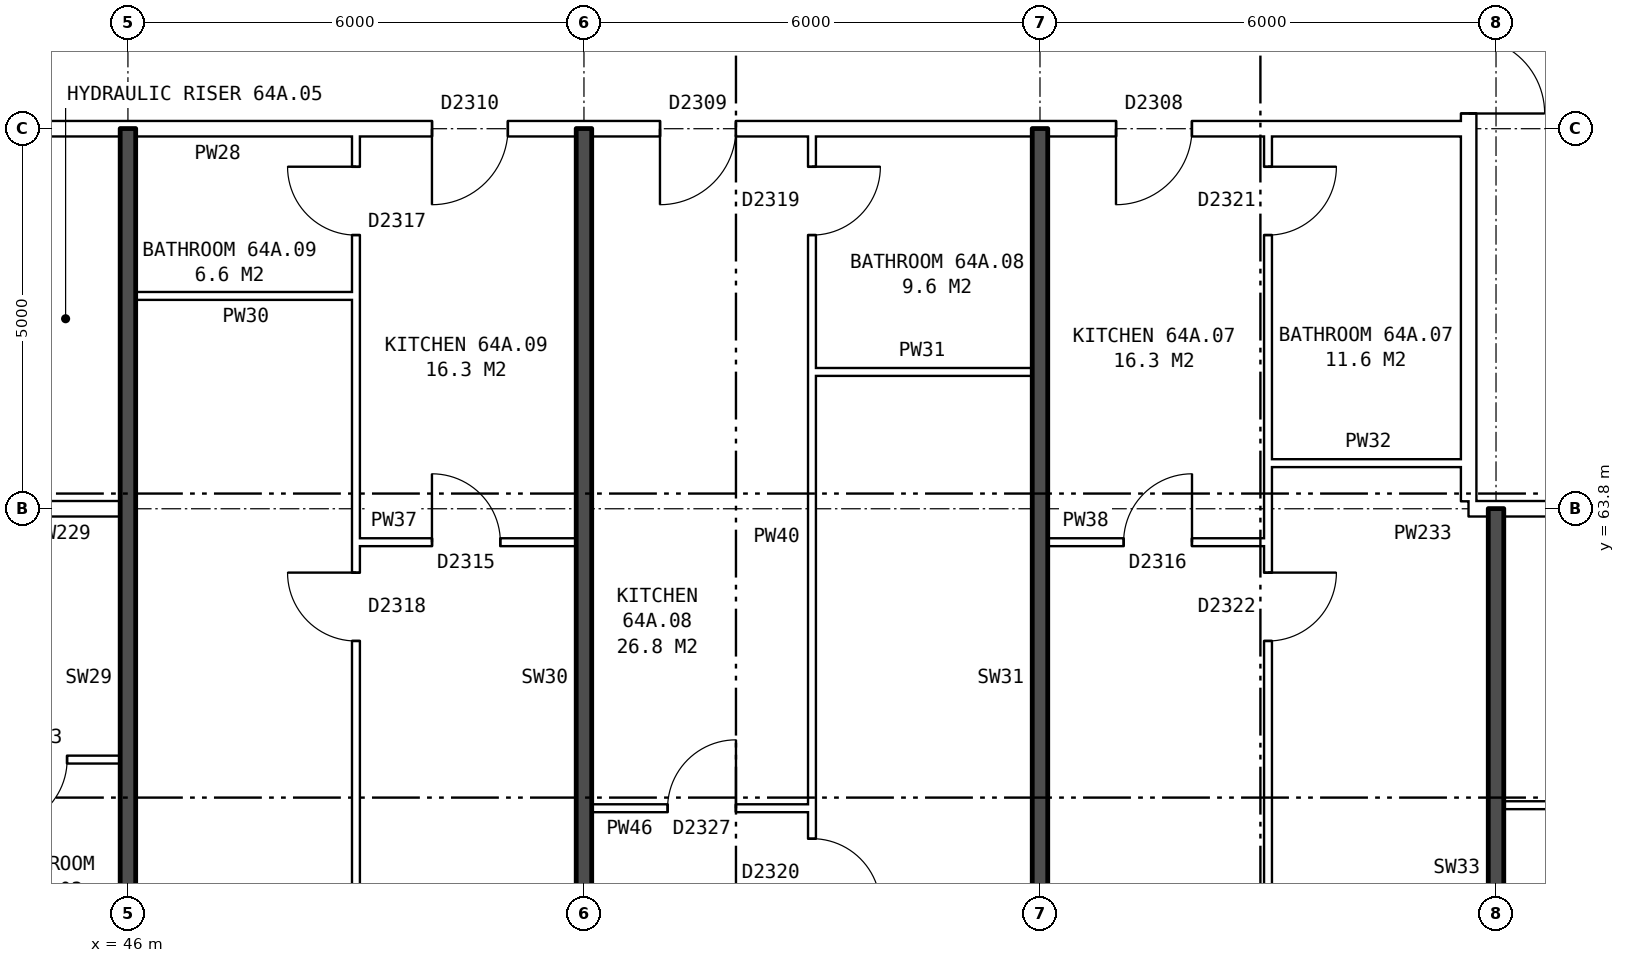
"""IFC4 building model, lengths in metres.
Left out: names, types, materials, properties, quantities, classifications, styles, units other than length and angle.
Written with IfcOpenShell. Run it as: python <this file> out.ifc"""

import sys

from ifc_helpers import new_model, si_unit, direction, frame, frame_2d, origin, place, context, subcontext, project, spatial, rectangle, extrude, element, fill, save


model = new_model("IFC4")
c1 = context("Model", 3, precision=1e-05, world=origin(), true_north=direction((0.0, 1.0)))
c2 = subcontext(c1, "Body", "Model", "MODEL_VIEW")
j1 = project(units=[si_unit("LENGTHUNIT", "METRE"), si_unit("PLANEANGLEUNIT", "RADIAN")], contexts=[c1])
p1 = place(None, origin())
s1 = spatial("IfcSite", under=j1, at=p1, CompositionType="ELEMENT")
p2 = place(p1, origin())
s2 = spatial("IfcBuilding", under=s1, at=p2, CompositionType="ELEMENT")
p3 = place(p2, frame((0.0, 0.0, 227.6)))
s3 = spatial("IfcBuildingStorey", under=s2, at=p3, CompositionType="ELEMENT", Elevation=227.6)
p4 = place(p3, frame((63.64, 63.9, 0.0), z_axis=(0.0, 0.0, 1.0), x_axis=(0.0, 1.0, 0.0)))
e1 = element("IfcWall", 1, at=p4, inside=s3, PredefinedType="PARTITIONING", context=c2, shape_type="SweptSolid", body=[
    extrude(rectangle(XDim=12.2, YDim=0.2, at=frame_2d((6.1, 0.0))), origin(), (0.0, 0.0, 1.0), 2.85),
])
p5 = place(p4, frame((5.1, 0.0, 0.0)))
e2 = element("IfcOpeningElement", 2, at=p5, cuts=e1, PredefinedType="OPENING", context=c2, shape_type="SweptSolid", body=[
    extrude(rectangle(XDim=2.0, YDim=2.1, at=frame_2d((1.0, 1.05))), frame((0.0, 0.11, 0.0), z_axis=(0.0, -1.0, 0.0), x_axis=(1.0, 0.0, 0.0)), (0.0, 0.0, 1.0), 0.22),
])
p6 = place(p3, frame((52.1, 59.86, 0.0), z_axis=(0.0, 0.0, 1.0), x_axis=(1.0, 0.0, 0.0)))
e3 = element("IfcWall", 3, at=p6, inside=s3, PredefinedType="PARTITIONING", context=c2, shape_type="SweptSolid", body=[
    extrude(rectangle(XDim=2.9, YDim=0.1, at=frame_2d((1.45, 0.0))), origin(), (0.0, 0.0, 1.0), 2.85),
])
p7 = place(p6, frame((1.0, 0.0, 0.0)))
e4 = element("IfcOpeningElement", 4, at=p7, cuts=e3, PredefinedType="OPENING", context=c2, shape_type="SweptSolid", body=[
    extrude(rectangle(XDim=0.9, YDim=2.1, at=frame_2d((0.45, 1.05))), frame((0.0, 0.06, 0.0), z_axis=(0.0, -1.0, 0.0), x_axis=(1.0, 0.0, 0.0)), (0.0, 0.0, 1.0), 0.12),
])
p8 = place(p3, frame((64.1, 59.9, 0.0), z_axis=(0.0, 0.0, 1.0), x_axis=(1.0, 0.0, 0.0)))
e5 = element("IfcWall", 5, at=p8, inside=s3, PredefinedType="PARTITIONING", context=c2, shape_type="SweptSolid", body=[
    extrude(rectangle(XDim=5.8, YDim=0.1, at=frame_2d((2.9, 0.0))), origin(), (0.0, 0.0, 1.0), 2.85),
])
p9 = place(p8, frame((3.6, 0.0, 0.0)))
e6 = element("IfcOpeningElement", 6, at=p9, cuts=e5, PredefinedType="OPENING", context=c2, shape_type="SweptSolid", body=[
    extrude(rectangle(XDim=0.9, YDim=2.1, at=frame_2d((0.45, 1.05))), frame((0.0, 0.06, 0.0), z_axis=(0.0, -1.0, 0.0), x_axis=(1.0, 0.0, 0.0)), (0.0, 0.0, 1.0), 0.12),
])
p10 = place(p8, frame((0.7, 0.0, 0.0)))
e7 = element("IfcOpeningElement", 7, at=p10, cuts=e5, PredefinedType="OPENING", context=c2, shape_type="SweptSolid", body=[
    extrude(rectangle(XDim=0.9, YDim=2.1, at=frame_2d((0.45, 1.05))), frame((0.0, 0.06, 0.0), z_axis=(0.0, -1.0, 0.0), x_axis=(1.0, 0.0, 0.0)), (0.0, 0.0, 1.0), 0.12),
])
p11 = place(p3, frame((40.1, 60.5, 0.0), z_axis=(0.0, 0.0, 1.0), x_axis=(1.0, 0.0, 0.0)))
e8 = element("IfcWall", 8, at=p11, inside=s3, PredefinedType="PARTITIONING", context=c2, shape_type="SweptSolid", body=[
    extrude(rectangle(XDim=5.8, YDim=0.1, at=frame_2d((2.9, 0.0))), origin(), (0.0, 0.0, 1.0), 2.85),
])
p12 = place(p11, frame((1.3, 0.0, 0.0)))
e9 = element("IfcOpeningElement", 9, at=p12, cuts=e8, PredefinedType="OPENING", context=c2, shape_type="SweptSolid", body=[
    extrude(rectangle(XDim=0.9, YDim=2.1, at=frame_2d((0.45, 1.05))), frame((0.0, 0.06, 0.0), z_axis=(0.0, -1.0, 0.0), x_axis=(1.0, 0.0, 0.0)), (0.0, 0.0, 1.0), 0.12),
])
p13 = place(p11, frame((4.2, 0.0, 0.0)))
e10 = element("IfcOpeningElement", 10, at=p13, cuts=e8, PredefinedType="OPENING", context=c2, shape_type="SweptSolid", body=[
    extrude(rectangle(XDim=0.9, YDim=2.1, at=frame_2d((0.45, 1.05))), frame((0.0, 0.06, 0.0), z_axis=(0.0, -1.0, 0.0), x_axis=(1.0, 0.0, 0.0)), (0.0, 0.0, 1.0), 0.12),
])
p14 = place(p3, frame((49.0, 63.36, 0.0), z_axis=(0.0, 0.0, 1.0), x_axis=(1.0, 0.0, 0.0)))
e11 = element("IfcWall", 11, at=p14, inside=s3, PredefinedType="PARTITIONING", context=c2, shape_type="SweptSolid", body=[
    extrude(rectangle(XDim=2.9, YDim=0.1, at=frame_2d((1.45, 0.0))), origin(), (0.0, 0.0, 1.0), 2.85),
])
p15 = place(p14, frame((1.0, 0.0, 0.0)))
e12 = element("IfcOpeningElement", 12, at=p15, cuts=e11, PredefinedType="OPENING", context=c2, shape_type="SweptSolid", body=[
    extrude(rectangle(XDim=0.9, YDim=2.1, at=frame_2d((0.45, 1.05))), frame((0.0, 0.06, 0.0), z_axis=(0.0, -1.0, 0.0), x_axis=(1.0, 0.0, 0.0)), (0.0, 0.0, 1.0), 0.12),
])
p16 = place(p3, frame((58.1, 63.36, 0.0), z_axis=(0.0, 0.0, 1.0), x_axis=(1.0, 0.0, 0.0)))
e13 = element("IfcWall", 13, at=p16, inside=s3, PredefinedType="PARTITIONING", context=c2, shape_type="SweptSolid", body=[
    extrude(rectangle(XDim=2.9, YDim=0.1, at=frame_2d((1.45, 0.0))), origin(), (0.0, 0.0, 1.0), 2.85),
])
p17 = place(p16, frame((1.0, 0.0, 0.0)))
e14 = element("IfcOpeningElement", 14, at=p17, cuts=e13, PredefinedType="OPENING", context=c2, shape_type="SweptSolid", body=[
    extrude(rectangle(XDim=0.9, YDim=2.1, at=frame_2d((0.45, 1.05))), frame((0.0, 0.06, 0.0), z_axis=(0.0, -1.0, 0.0), x_axis=(1.0, 0.0, 0.0)), (0.0, 0.0, 1.0), 0.12),
])
p18 = place(p3, frame((44.36, 63.8, 0.0), z_axis=(0.0, 0.0, 1.0), x_axis=(1.0, 0.0, 0.0)))
e15 = element("IfcWall", 15, at=p18, inside=s3, PredefinedType="PARTITIONING", context=c2, shape_type="SweptSolid", body=[
    extrude(rectangle(XDim=1.54, YDim=0.2, at=frame_2d((0.77, 0.0))), origin(), (0.0, 0.0, 1.0), 2.85),
])
p19 = place(p3, frame((63.64, 63.8, 0.0), z_axis=(0.0, 0.0, 1.0), x_axis=(1.0, 0.0, 0.0)))
e16 = element("IfcWall", 16, at=p19, inside=s3, PredefinedType="PARTITIONING", context=c2, shape_type="SweptSolid", body=[
    extrude(rectangle(XDim=3.0, YDim=0.2, at=frame_2d((1.5, 0.0))), origin(), (0.0, 0.0, 1.0), 2.85),
])
p20 = place(p19, frame((1.18, 0.0, 0.0)))
e17 = element("IfcOpeningElement", 17, at=p20, cuts=e16, PredefinedType="OPENING", context=c2, shape_type="SweptSolid", body=[
    extrude(rectangle(XDim=1.0, YDim=2.1, at=frame_2d((0.5, 1.05))), frame((0.0, 0.11, 0.0), z_axis=(0.0, -1.0, 0.0), x_axis=(1.0, 0.0, 0.0)), (0.0, 0.0, 1.0), 0.22),
])
p21 = place(p3, frame((61.0, 64.4, 0.0), z_axis=(0.0, 0.0, 1.0), x_axis=(1.0, 0.0, 0.0)))
e18 = element("IfcWall", 18, at=p21, inside=s3, PredefinedType="PARTITIONING", context=c2, shape_type="SweptSolid", body=[
    extrude(rectangle(XDim=2.64, YDim=0.1, at=frame_2d((1.32, 0.0))), origin(), (0.0, 0.0, 1.0), 2.85),
])
for number, where, z_axis, x_axis in (
    (19, (55.0, 65.6, 0.0), (0.0, 0.0, 1.0), (1.0, 0.0, 0.0)),
    (20, (46.1, 66.6, 0.0), (0.0, 0.0, 1.0), (1.0, 0.0, 0.0)),
):
    element("IfcWall", number, at=place(p3, frame(where, z_axis=z_axis, x_axis=x_axis)), inside=s3, PredefinedType="PARTITIONING", context=c2, shape_type="SweptSolid", body=[
        extrude(rectangle(XDim=2.9, YDim=0.1, at=frame_2d((1.45, 0.0))), origin(), (0.0, 0.0, 1.0), 2.85),
    ])
p22 = place(p3, frame((44.36, 68.8, 0.0), z_axis=(0.0, 0.0, 1.0), x_axis=(1.0, 0.0, 0.0)))
e21 = element("IfcWall", 21, at=p22, inside=s3, PredefinedType="PARTITIONING", context=c2, shape_type="SweptSolid", body=[
    extrude(rectangle(XDim=19.28, YDim=0.2, at=frame_2d((9.64, 0.0))), origin(), (0.0, 0.0, 1.0), 2.85),
])
p23 = place(p22, frame((14.64, 0.0, 0.0)))
e22 = element("IfcOpeningElement", 22, at=p23, cuts=e21, PredefinedType="OPENING", context=c2, shape_type="SweptSolid", body=[
    extrude(rectangle(XDim=1.0, YDim=2.1, at=frame_2d((0.5, 1.05))), frame((0.0, 0.11, 0.0), z_axis=(0.0, -1.0, 0.0), x_axis=(1.0, 0.0, 0.0)), (0.0, 0.0, 1.0), 0.22),
])
p24 = place(p22, frame((8.64, 0.0, 0.0)))
e23 = element("IfcOpeningElement", 23, at=p24, cuts=e21, PredefinedType="OPENING", context=c2, shape_type="SweptSolid", body=[
    extrude(rectangle(XDim=1.0, YDim=2.1, at=frame_2d((0.5, 1.05))), frame((0.0, 0.11, 0.0), z_axis=(0.0, -1.0, 0.0), x_axis=(1.0, 0.0, 0.0)), (0.0, 0.0, 1.0), 0.22),
])
p25 = place(p22, frame((5.64, 0.0, 0.0)))
e24 = element("IfcOpeningElement", 24, at=p25, cuts=e21, PredefinedType="OPENING", context=c2, shape_type="SweptSolid", body=[
    extrude(rectangle(XDim=1.0, YDim=2.1, at=frame_2d((0.5, 1.05))), frame((0.0, 0.11, 0.0), z_axis=(0.0, -1.0, 0.0), x_axis=(1.0, 0.0, 0.0)), (0.0, 0.0, 1.0), 0.22),
])
p26 = place(p3, frame((46.0, 54.36, 0.0), z_axis=(0.0, 0.0, 1.0), x_axis=(0.0, 1.0, 0.0)))
e25 = element("IfcWall", 25, at=p26, inside=s3, PredefinedType="SOLIDWALL", context=c2, shape_type="SweptSolid", body=[
    extrude(rectangle(XDim=14.44, YDim=0.2, at=frame_2d((7.22, 0.0))), origin(), (0.0, 0.0, 1.0), 2.85),
])
p27 = place(p3, frame((49.0, 54.36, 0.0), z_axis=(0.0, 0.0, 1.0), x_axis=(0.0, 1.0, 0.0)))
e26 = element("IfcWall", 26, at=p27, inside=s3, PredefinedType="PARTITIONING", context=c2, shape_type="SweptSolid", body=[
    extrude(rectangle(XDim=14.34, YDim=0.1, at=frame_2d((7.17, 0.0))), origin(), (0.0, 0.0, 1.0), 2.85),
])
p28 = place(p27, frame((7.7, 0.0, 0.0)))
e27 = element("IfcOpeningElement", 27, at=p28, cuts=e26, PredefinedType="OPENING", context=c2, shape_type="SweptSolid", body=[
    extrude(rectangle(XDim=0.9, YDim=2.1, at=frame_2d((0.45, 1.05))), frame((0.0, 0.06, 0.0), z_axis=(0.0, -1.0, 0.0), x_axis=(1.0, 0.0, 0.0)), (0.0, 0.0, 1.0), 0.12),
])
p29 = place(p27, frame((13.04, 0.0, 0.0)))
e28 = element("IfcOpeningElement", 28, at=p29, cuts=e26, PredefinedType="OPENING", context=c2, shape_type="SweptSolid", body=[
    extrude(rectangle(XDim=0.9, YDim=2.1, at=frame_2d((0.45, 1.05))), frame((0.0, 0.06, 0.0), z_axis=(0.0, -1.0, 0.0), x_axis=(1.0, 0.0, 0.0)), (0.0, 0.0, 1.0), 0.12),
])
p30 = place(p3, frame((52.0, 54.36, 0.0), z_axis=(0.0, 0.0, 1.0), x_axis=(0.0, 1.0, 0.0)))
e29 = element("IfcWall", 29, at=p30, inside=s3, PredefinedType="SOLIDWALL", context=c2, shape_type="SweptSolid", body=[
    extrude(rectangle(XDim=14.44, YDim=0.2, at=frame_2d((7.22, 0.0))), origin(), (0.0, 0.0, 1.0), 2.85),
])
p31 = place(p3, frame((55.0, 54.36, 0.0), z_axis=(0.0, 0.0, 1.0), x_axis=(0.0, 1.0, 0.0)))
e30 = element("IfcWall", 30, at=p31, inside=s3, PredefinedType="PARTITIONING", context=c2, shape_type="SweptSolid", body=[
    extrude(rectangle(XDim=14.34, YDim=0.1, at=frame_2d((7.17, 0.0))), origin(), (0.0, 0.0, 1.0), 2.85),
])
p32 = place(p31, frame((4.2, 0.0, 0.0)))
e31 = element("IfcOpeningElement", 31, at=p32, cuts=e30, PredefinedType="OPENING", context=c2, shape_type="SweptSolid", body=[
    extrude(rectangle(XDim=0.9, YDim=2.1, at=frame_2d((0.45, 1.05))), frame((0.0, 0.06, 0.0), z_axis=(0.0, -1.0, 0.0), x_axis=(1.0, 0.0, 0.0)), (0.0, 0.0, 1.0), 0.12),
])
p33 = place(p31, frame((13.04, 0.0, 0.0)))
e32 = element("IfcOpeningElement", 32, at=p33, cuts=e30, PredefinedType="OPENING", context=c2, shape_type="SweptSolid", body=[
    extrude(rectangle(XDim=0.9, YDim=2.1, at=frame_2d((0.45, 1.05))), frame((0.0, 0.06, 0.0), z_axis=(0.0, -1.0, 0.0), x_axis=(1.0, 0.0, 0.0)), (0.0, 0.0, 1.0), 0.12),
])
p34 = place(p3, frame((58.0, 54.36, 0.0), z_axis=(0.0, 0.0, 1.0), x_axis=(0.0, 1.0, 0.0)))
e33 = element("IfcWall", 33, at=p34, inside=s3, PredefinedType="SOLIDWALL", context=c2, shape_type="SweptSolid", body=[
    extrude(rectangle(XDim=14.44, YDim=0.2, at=frame_2d((7.22, 0.0))), origin(), (0.0, 0.0, 1.0), 2.85),
])
p35 = place(p3, frame((61.0, 54.36, 0.0), z_axis=(0.0, 0.0, 1.0), x_axis=(0.0, 1.0, 0.0)))
e34 = element("IfcWall", 34, at=p35, inside=s3, PredefinedType="PARTITIONING", context=c2, shape_type="SweptSolid", body=[
    extrude(rectangle(XDim=14.34, YDim=0.1, at=frame_2d((7.17, 0.0))), origin(), (0.0, 0.0, 1.0), 2.85),
])
p36 = place(p35, frame((7.7, 0.0, 0.0)))
e35 = element("IfcOpeningElement", 35, at=p36, cuts=e34, PredefinedType="OPENING", context=c2, shape_type="SweptSolid", body=[
    extrude(rectangle(XDim=0.9, YDim=2.1, at=frame_2d((0.45, 1.05))), frame((0.0, 0.06, 0.0), z_axis=(0.0, -1.0, 0.0), x_axis=(1.0, 0.0, 0.0)), (0.0, 0.0, 1.0), 0.12),
])
p37 = place(p35, frame((13.04, 0.0, 0.0)))
e36 = element("IfcOpeningElement", 36, at=p37, cuts=e34, PredefinedType="OPENING", context=c2, shape_type="SweptSolid", body=[
    extrude(rectangle(XDim=0.9, YDim=2.1, at=frame_2d((0.45, 1.05))), frame((0.0, 0.06, 0.0), z_axis=(0.0, -1.0, 0.0), x_axis=(1.0, 0.0, 0.0)), (0.0, 0.0, 1.0), 0.12),
])
p38 = place(p3, frame((64.0, 54.36, 0.0), z_axis=(0.0, 0.0, 1.0), x_axis=(0.0, 1.0, 0.0)))
e37 = element("IfcWall", 37, at=p38, inside=s3, PredefinedType="SOLIDWALL", context=c2, shape_type="SweptSolid", body=[
    extrude(rectangle(XDim=9.44, YDim=0.2, at=frame_2d((4.72, 0.0))), origin(), (0.0, 0.0, 1.0), 2.85),
])
p39 = place(p5, frame((2.0, 0.0, 0.0), z_axis=(0.0, 0.0, 1.0), x_axis=(-1.0, 0.0, 0.0)))
e38 = element("IfcDoor", 38, at=p39, inside=s3, OperationType="DOUBLE_DOOR_SINGLE_SWING", PredefinedType="DOOR", context=c2, shape_type="SweptSolid", body=[
    extrude(rectangle(XDim=2.0, YDim=2.1, at=frame_2d((1.0, 1.05))), frame((0.0, 0.025, 0.0), z_axis=(0.0, -1.0, 0.0), x_axis=(1.0, 0.0, 0.0)), (0.0, 0.0, 1.0), 0.05),
])
fill(e2, e38)
p40 = place(p13, frame((0.9, 0.0, 0.0), z_axis=(0.0, 0.0, 1.0), x_axis=(-1.0, 0.0, 0.0)))
e39 = element("IfcDoor", 39, at=p40, inside=s3, OperationType="SINGLE_SWING_RIGHT", PredefinedType="DOOR", context=c2, shape_type="SweptSolid", body=[
    extrude(rectangle(XDim=0.9, YDim=2.1, at=frame_2d((0.45, 1.05))), frame((0.0, 0.025, 0.0), z_axis=(0.0, -1.0, 0.0), x_axis=(1.0, 0.0, 0.0)), (0.0, 0.0, 1.0), 0.05),
])
fill(e10, e39)
p41 = place(p36, frame((0.9, 0.0, 0.0), z_axis=(0.0, 0.0, 1.0), x_axis=(-1.0, 0.0, 0.0)))
e40 = element("IfcDoor", 40, at=p41, inside=s3, OperationType="SINGLE_SWING_LEFT", PredefinedType="DOOR", context=c2, shape_type="SweptSolid", body=[
    extrude(rectangle(XDim=0.9, YDim=2.1, at=frame_2d((0.45, 1.05))), frame((0.0, 0.025, 0.0), z_axis=(0.0, -1.0, 0.0), x_axis=(1.0, 0.0, 0.0)), (0.0, 0.0, 1.0), 0.05),
])
fill(e35, e40)
p42 = place(p23, frame((1.0, 0.0, 0.0), z_axis=(0.0, 0.0, 1.0), x_axis=(-1.0, 0.0, 0.0)))
e41 = element("IfcDoor", 41, at=p42, inside=s3, OperationType="SINGLE_SWING_RIGHT", PredefinedType="DOOR", context=c2, shape_type="SweptSolid", body=[
    extrude(rectangle(XDim=1.0, YDim=2.1, at=frame_2d((0.5, 1.05))), frame((0.0, 0.025, 0.0), z_axis=(0.0, -1.0, 0.0), x_axis=(1.0, 0.0, 0.0)), (0.0, 0.0, 1.0), 0.05),
])
fill(e22, e41)
p43 = place(p17, origin())
e42 = element("IfcDoor", 42, at=p43, inside=s3, OperationType="SINGLE_SWING_RIGHT", PredefinedType="DOOR", context=c2, shape_type="SweptSolid", body=[
    extrude(rectangle(XDim=0.9, YDim=2.1, at=frame_2d((0.45, 1.05))), frame((0.0, 0.025, 0.0), z_axis=(0.0, -1.0, 0.0), x_axis=(1.0, 0.0, 0.0)), (0.0, 0.0, 1.0), 0.05),
])
fill(e14, e42)
p44 = place(p37, frame((0.9, 0.0, 0.0), z_axis=(0.0, 0.0, 1.0), x_axis=(-1.0, 0.0, 0.0)))
e43 = element("IfcDoor", 43, at=p44, inside=s3, OperationType="SINGLE_SWING_LEFT", PredefinedType="DOOR", context=c2, shape_type="SweptSolid", body=[
    extrude(rectangle(XDim=0.9, YDim=2.1, at=frame_2d((0.45, 1.05))), frame((0.0, 0.025, 0.0), z_axis=(0.0, -1.0, 0.0), x_axis=(1.0, 0.0, 0.0)), (0.0, 0.0, 1.0), 0.05),
])
fill(e36, e43)
p45 = place(p32, frame((0.9, 0.0, 0.0), z_axis=(0.0, 0.0, 1.0), x_axis=(-1.0, 0.0, 0.0)))
e44 = element("IfcDoor", 44, at=p45, inside=s3, OperationType="SINGLE_SWING_RIGHT", PredefinedType="DOOR", context=c2, shape_type="SweptSolid", body=[
    extrude(rectangle(XDim=0.9, YDim=2.1, at=frame_2d((0.45, 1.05))), frame((0.0, 0.025, 0.0), z_axis=(0.0, -1.0, 0.0), x_axis=(1.0, 0.0, 0.0)), (0.0, 0.0, 1.0), 0.05),
])
fill(e31, e44)
p46 = place(p24, frame((1.0, 0.0, 0.0), z_axis=(0.0, 0.0, 1.0), x_axis=(-1.0, 0.0, 0.0)))
e45 = element("IfcDoor", 45, at=p46, inside=s3, OperationType="SINGLE_SWING_RIGHT", PredefinedType="DOOR", context=c2, shape_type="SweptSolid", body=[
    extrude(rectangle(XDim=1.0, YDim=2.1, at=frame_2d((0.5, 1.05))), frame((0.0, 0.025, 0.0), z_axis=(0.0, -1.0, 0.0), x_axis=(1.0, 0.0, 0.0)), (0.0, 0.0, 1.0), 0.05),
])
fill(e23, e45)
p47 = place(p7, origin())
e46 = element("IfcDoor", 46, at=p47, inside=s3, OperationType="SINGLE_SWING_RIGHT", PredefinedType="DOOR", context=c2, shape_type="SweptSolid", body=[
    extrude(rectangle(XDim=0.9, YDim=2.1, at=frame_2d((0.45, 1.05))), frame((0.0, 0.025, 0.0), z_axis=(0.0, -1.0, 0.0), x_axis=(1.0, 0.0, 0.0)), (0.0, 0.0, 1.0), 0.05),
])
fill(e4, e46)
p48 = place(p33, frame((0.9, 0.0, 0.0), z_axis=(0.0, 0.0, 1.0), x_axis=(-1.0, 0.0, 0.0)))
e47 = element("IfcDoor", 47, at=p48, inside=s3, OperationType="SINGLE_SWING_LEFT", PredefinedType="DOOR", context=c2, shape_type="SweptSolid", body=[
    extrude(rectangle(XDim=0.9, YDim=2.1, at=frame_2d((0.45, 1.05))), frame((0.0, 0.025, 0.0), z_axis=(0.0, -1.0, 0.0), x_axis=(1.0, 0.0, 0.0)), (0.0, 0.0, 1.0), 0.05),
])
fill(e32, e47)
p49 = place(p28, origin())
e48 = element("IfcDoor", 48, at=p49, inside=s3, OperationType="SINGLE_SWING_RIGHT", PredefinedType="DOOR", context=c2, shape_type="SweptSolid", body=[
    extrude(rectangle(XDim=0.9, YDim=2.1, at=frame_2d((0.45, 1.05))), frame((0.0, 0.025, 0.0), z_axis=(0.0, -1.0, 0.0), x_axis=(1.0, 0.0, 0.0)), (0.0, 0.0, 1.0), 0.05),
])
fill(e27, e48)
p50 = place(p25, frame((1.0, 0.0, 0.0), z_axis=(0.0, 0.0, 1.0), x_axis=(-1.0, 0.0, 0.0)))
e49 = element("IfcDoor", 49, at=p50, inside=s3, OperationType="SINGLE_SWING_RIGHT", PredefinedType="DOOR", context=c2, shape_type="SweptSolid", body=[
    extrude(rectangle(XDim=1.0, YDim=2.1, at=frame_2d((0.5, 1.05))), frame((0.0, 0.025, 0.0), z_axis=(0.0, -1.0, 0.0), x_axis=(1.0, 0.0, 0.0)), (0.0, 0.0, 1.0), 0.05),
])
fill(e24, e49)
p51 = place(p15, origin())
e50 = element("IfcDoor", 50, at=p51, inside=s3, OperationType="SINGLE_SWING_LEFT", PredefinedType="DOOR", context=c2, shape_type="SweptSolid", body=[
    extrude(rectangle(XDim=0.9, YDim=2.1, at=frame_2d((0.45, 1.05))), frame((0.0, 0.025, 0.0), z_axis=(0.0, -1.0, 0.0), x_axis=(1.0, 0.0, 0.0)), (0.0, 0.0, 1.0), 0.05),
])
fill(e12, e50)
p52 = place(p29, origin())
e51 = element("IfcDoor", 51, at=p52, inside=s3, OperationType="SINGLE_SWING_RIGHT", PredefinedType="DOOR", context=c2, shape_type="SweptSolid", body=[
    extrude(rectangle(XDim=0.9, YDim=2.1, at=frame_2d((0.45, 1.05))), frame((0.0, 0.025, 0.0), z_axis=(0.0, -1.0, 0.0), x_axis=(1.0, 0.0, 0.0)), (0.0, 0.0, 1.0), 0.05),
])
fill(e28, e51)
save(model, sys.argv[1])
